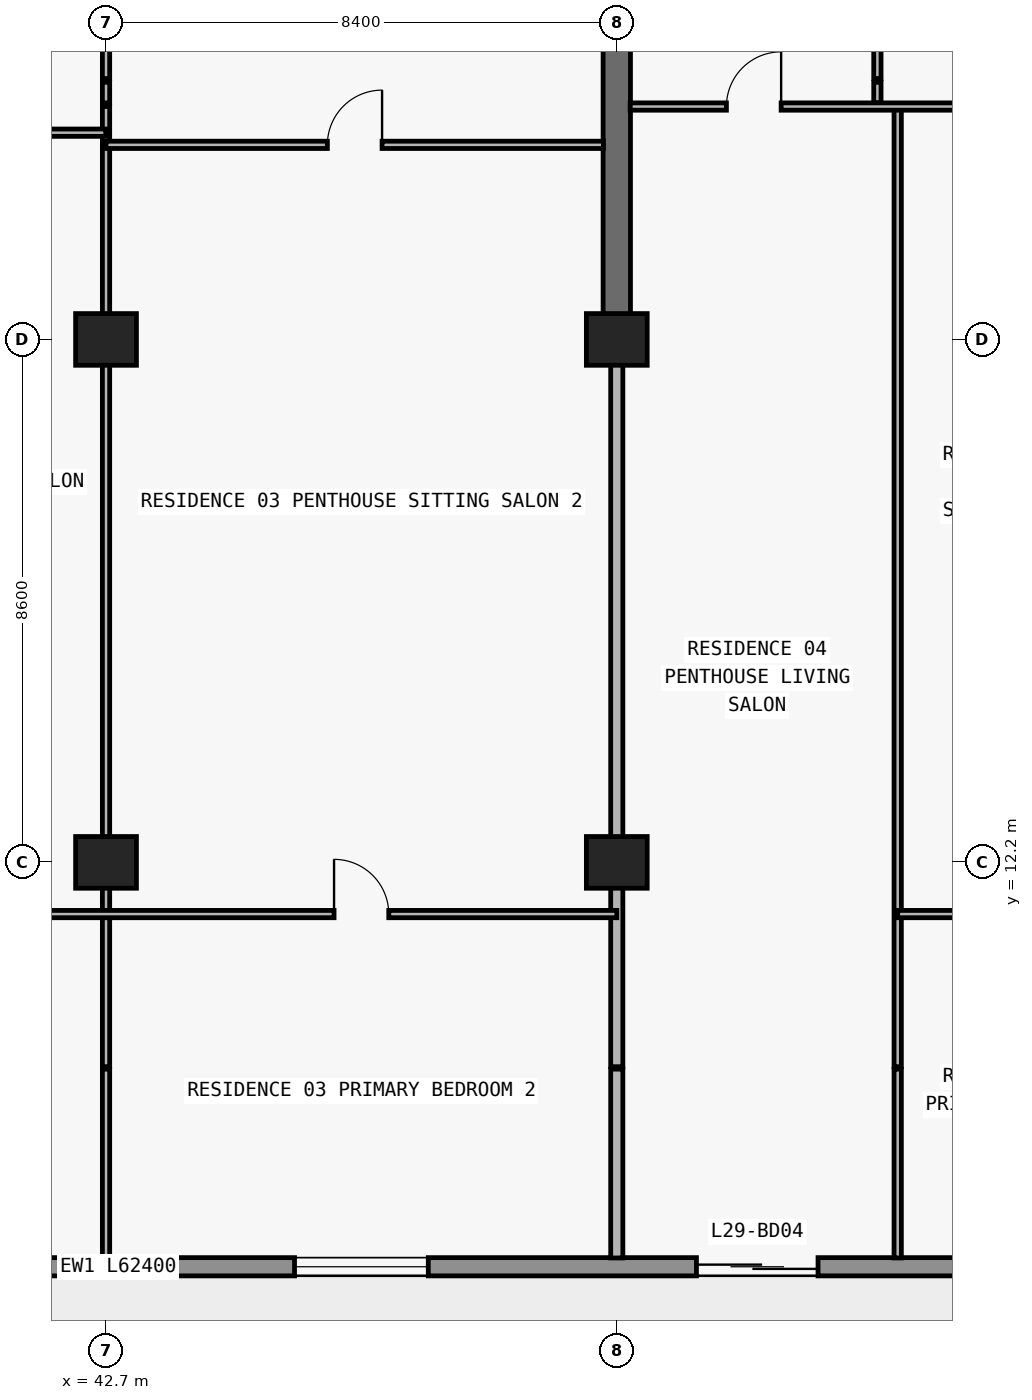
"""IFC4 building model, lengths in metres.
Left out: names, types, materials, properties, quantities, classifications, styles, units other than length and angle.
Written with IfcOpenShell. Run it as: python <this file> out.ifc"""

import sys

from ifc_helpers import new_model, si_unit, direction, frame, frame_2d, origin, origin_2d, place, context, subcontext, project, spatial, rectangle, extrude, element, fill, save


model = new_model("IFC4")
c1 = context("Model", 3, precision=1e-05, world=origin(), true_north=direction((0.0, 1.0)))
c2 = subcontext(c1, "Body", "Model", "MODEL_VIEW")
j1 = project(units=[si_unit("LENGTHUNIT", "METRE"), si_unit("PLANEANGLEUNIT", "RADIAN")], contexts=[c1])
p1 = place(None, origin())
s1 = spatial("IfcSite", under=j1, at=p1, CompositionType="ELEMENT")
p2 = place(p1, origin())
s2 = spatial("IfcBuilding", under=s1, at=p2, CompositionType="ELEMENT")
p3 = place(p2, frame((0.0, 0.0, 109.2)))
s3 = spatial("IfcBuildingStorey", under=s2, at=p3, CompositionType="ELEMENT", Elevation=109.2)
for number, where, z_axis, x_axis in (
    (1, (42.7, 12.2, 0.0), (0.0, 0.0, 1.0), (1.0, 0.0, 0.0)),
    (2, (51.1, 12.2, 0.0), (0.0, 0.0, 1.0), (1.0, 0.0, 0.0)),
    (3, (42.7, 20.8, 0.0), (0.0, 0.0, 1.0), (1.0, 0.0, 0.0)),
    (4, (51.1, 20.8, 0.0), (0.0, 0.0, 1.0), (1.0, 0.0, 0.0)),
):
    element("IfcColumn", number, at=place(p3, frame(where, z_axis=z_axis, x_axis=x_axis)), inside=s3, PredefinedType="COLUMN", context=c2, shape_type="SweptSolid", body=[
        extrude(rectangle(XDim=1.0, YDim=0.85, at=origin_2d()), origin(), (0.0, 0.0, 1.0), 3.05),
    ])
p4 = place(p3, frame((51.1, 20.8, 0.0), z_axis=(0.0, 0.0, 1.0), x_axis=(0.0, 1.0, 0.0)))
e5 = element("IfcWall", 5, at=p4, inside=s3, PredefinedType="SHEAR", context=c2, shape_type="SweptSolid", body=[
    extrude(rectangle(XDim=8.6, YDim=0.45, at=frame_2d((4.3, 0.0))), origin(), (0.0, 0.0, 1.0), 3.05),
])
p5 = place(p3, frame((70.1, 5.55, 0.0), z_axis=(0.0, 0.0, 1.0), x_axis=(-1.0, 0.0, 0.0)))
e6 = element("IfcWall", 6, at=p5, inside=s3, PredefinedType="STANDARD", context=c2, shape_type="SweptSolid", body=[
    extrude(rectangle(XDim=62.4, YDim=0.3, at=frame_2d((31.2, 0.0))), origin(), (0.0, 0.0, 1.0), 3.05),
])
p6 = place(p5, frame((57.226, 0.0, 0.0)))
e7 = element("IfcOpeningElement", 7, at=p6, cuts=e6, PredefinedType="OPENING", context=c2, shape_type="SweptSolid", body=[
    extrude(rectangle(XDim=2.0, YDim=2.3, at=frame_2d((1.0, 1.15))), frame((0.0, 0.16, 0.0), z_axis=(0.0, -1.0, 0.0), x_axis=(1.0, 0.0, 0.0)), (0.0, 0.0, 1.0), 0.32),
])
p7 = place(p5, frame((52.926, 0.0, 0.85)))
e8 = element("IfcOpeningElement", 8, at=p7, cuts=e6, PredefinedType="OPENING", context=c2, shape_type="SweptSolid", body=[
    extrude(rectangle(XDim=2.2, YDim=1.55, at=frame_2d((1.1, 0.775))), frame((0.0, 0.16, 0.0), z_axis=(0.0, -1.0, 0.0), x_axis=(1.0, 0.0, 0.0)), (0.0, 0.0, 1.0), 0.32),
])
p8 = place(p5, frame((48.49, 0.0, 0.0)))
e9 = element("IfcOpeningElement", 9, at=p8, cuts=e6, PredefinedType="OPENING", context=c2, shape_type="SweptSolid", body=[
    extrude(rectangle(XDim=2.0, YDim=2.3, at=frame_2d((1.0, 1.15))), frame((0.0, 0.16, 0.0), z_axis=(0.0, -1.0, 0.0), x_axis=(1.0, 0.0, 0.0)), (0.0, 0.0, 1.0), 0.32),
])
p9 = place(p5, frame((44.39, 0.0, 0.85)))
e10 = element("IfcOpeningElement", 10, at=p9, cuts=e6, PredefinedType="OPENING", context=c2, shape_type="SweptSolid", body=[
    extrude(rectangle(XDim=1.8, YDim=1.55, at=frame_2d((0.9, 0.775))), frame((0.0, 0.16, 0.0), z_axis=(0.0, -1.0, 0.0), x_axis=(1.0, 0.0, 0.0)), (0.0, 0.0, 1.0), 0.32),
])
p10 = place(p5, frame((40.49, 0.0, 0.0)))
e11 = element("IfcOpeningElement", 11, at=p10, cuts=e6, PredefinedType="OPENING", context=c2, shape_type="SweptSolid", body=[
    extrude(rectangle(XDim=2.0, YDim=2.3, at=frame_2d((1.0, 1.15))), frame((0.0, 0.16, 0.0), z_axis=(0.0, -1.0, 0.0), x_axis=(1.0, 0.0, 0.0)), (0.0, 0.0, 1.0), 0.32),
])
p11 = place(p5, frame((35.81, 0.0, 0.65)))
e12 = element("IfcOpeningElement", 12, at=p11, cuts=e6, PredefinedType="OPENING", context=c2, shape_type="SweptSolid", body=[
    extrude(rectangle(XDim=2.6, YDim=1.85, at=frame_2d((1.3, 0.925))), frame((0.0, 0.16, 0.0), z_axis=(0.0, -1.0, 0.0), x_axis=(1.0, 0.0, 0.0)), (0.0, 0.0, 1.0), 0.32),
])
p12 = place(p5, frame((30.1, 0.0, 0.85)))
e13 = element("IfcOpeningElement", 13, at=p12, cuts=e6, PredefinedType="OPENING", context=c2, shape_type="SweptSolid", body=[
    extrude(rectangle(XDim=2.2, YDim=1.55, at=frame_2d((1.1, 0.775))), frame((0.0, 0.16, 0.0), z_axis=(0.0, -1.0, 0.0), x_axis=(1.0, 0.0, 0.0)), (0.0, 0.0, 1.0), 0.32),
])
p13 = place(p5, frame((22.1, 0.0, 0.85)))
e14 = element("IfcOpeningElement", 14, at=p13, cuts=e6, PredefinedType="OPENING", context=c2, shape_type="SweptSolid", body=[
    extrude(rectangle(XDim=2.2, YDim=1.55, at=frame_2d((1.1, 0.775))), frame((0.0, 0.16, 0.0), z_axis=(0.0, -1.0, 0.0), x_axis=(1.0, 0.0, 0.0)), (0.0, 0.0, 1.0), 0.32),
])
p14 = place(p5, frame((15.69, 0.0, 0.0)))
e15 = element("IfcOpeningElement", 15, at=p14, cuts=e6, PredefinedType="OPENING", context=c2, shape_type="SweptSolid", body=[
    extrude(rectangle(XDim=2.0, YDim=2.3, at=frame_2d((1.0, 1.15))), frame((0.0, 0.16, 0.0), z_axis=(0.0, -1.0, 0.0), x_axis=(1.0, 0.0, 0.0)), (0.0, 0.0, 1.0), 0.32),
])
p15 = place(p5, frame((11.59, 0.0, 0.85)))
e16 = element("IfcOpeningElement", 16, at=p15, cuts=e6, PredefinedType="OPENING", context=c2, shape_type="SweptSolid", body=[
    extrude(rectangle(XDim=1.8, YDim=1.55, at=frame_2d((0.9, 0.775))), frame((0.0, 0.16, 0.0), z_axis=(0.0, -1.0, 0.0), x_axis=(1.0, 0.0, 0.0)), (0.0, 0.0, 1.0), 0.32),
])
p16 = place(p5, frame((7.626, 0.0, 0.0)))
e17 = element("IfcOpeningElement", 17, at=p16, cuts=e6, PredefinedType="OPENING", context=c2, shape_type="SweptSolid", body=[
    extrude(rectangle(XDim=2.0, YDim=2.3, at=frame_2d((1.0, 1.15))), frame((0.0, 0.16, 0.0), z_axis=(0.0, -1.0, 0.0), x_axis=(1.0, 0.0, 0.0)), (0.0, 0.0, 1.0), 0.32),
])
p17 = place(p5, frame((3.326, 0.0, 0.85)))
e18 = element("IfcOpeningElement", 18, at=p17, cuts=e6, PredefinedType="OPENING", context=c2, shape_type="SweptSolid", body=[
    extrude(rectangle(XDim=2.2, YDim=1.55, at=frame_2d((1.1, 0.775))), frame((0.0, 0.16, 0.0), z_axis=(0.0, -1.0, 0.0), x_axis=(1.0, 0.0, 0.0)), (0.0, 0.0, 1.0), 0.32),
])
p18 = place(p3, frame((42.7, 5.695, 0.0), z_axis=(0.0, 0.0, 1.0), x_axis=(0.0, 1.0, 0.0)))
e19 = element("IfcWall", 19, at=p18, inside=s3, PredefinedType="PARTITIONING", context=c2, shape_type="SweptSolid", body=[
    extrude(rectangle(XDim=3.105, YDim=0.12, at=frame_2d((1.552, 0.0))), origin(), (0.0, 0.0, 1.0), 3.05),
])
p19 = place(p3, frame((42.7, 8.84, 0.0), z_axis=(0.0, 0.0, 1.0), x_axis=(0.0, 1.0, 0.0)))
e20 = element("IfcWall", 20, at=p19, inside=s3, PredefinedType="PARTITIONING", context=c2, shape_type="SweptSolid", body=[
    extrude(rectangle(XDim=15.79, YDim=0.12, at=frame_2d((7.895, 0.0))), origin(), (0.0, 0.0, 1.0), 2.174),
])
p20 = place(p3, frame((42.7, 24.69, 0.0), z_axis=(0.0, 0.0, 1.0), x_axis=(0.0, 1.0, 0.0)))
e21 = element("IfcWall", 21, at=p20, inside=s3, PredefinedType="PARTITIONING", context=c2, shape_type="SweptSolid", body=[
    extrude(rectangle(XDim=0.34, YDim=0.12, at=frame_2d((0.17, 0.0))), origin(), (0.0, 0.0, 1.0), 2.174),
])
p21 = place(p3, frame((42.7, 25.09, 0.0), z_axis=(0.0, 0.0, 1.0), x_axis=(0.0, 1.0, 0.0)))
e22 = element("IfcWall", 22, at=p21, inside=s3, PredefinedType="PARTITIONING", context=c2, shape_type="SweptSolid", body=[
    extrude(rectangle(XDim=4.69, YDim=0.12, at=frame_2d((2.345, 0.0))), origin(), (0.0, 0.0, 1.0), 2.174),
])
p22 = place(p21, frame((1.305, 0.0, 0.0)))
e23 = element("IfcOpeningElement", 23, at=p22, cuts=e22, PredefinedType="OPENING", context=c2, shape_type="SweptSolid", body=[
    extrude(rectangle(XDim=0.9, YDim=2.124, at=frame_2d((0.45, 1.062))), frame((0.0, 0.07, 0.0), z_axis=(0.0, -1.0, 0.0), x_axis=(1.0, 0.0, 0.0)), (0.0, 0.0, 1.0), 0.14),
])
p23 = place(p3, frame((51.1, 5.695, 0.0), z_axis=(0.0, 0.0, 1.0), x_axis=(0.0, 1.0, 0.0)))
e24 = element("IfcWall", 24, at=p23, inside=s3, PredefinedType="PARTITIONING", context=c2, shape_type="SweptSolid", body=[
    extrude(rectangle(XDim=3.105, YDim=0.2, at=frame_2d((1.552, 0.0))), origin(), (0.0, 0.0, 1.0), 3.05),
])
p24 = place(p3, frame((51.1, 8.84, 0.0), z_axis=(0.0, 0.0, 1.0), x_axis=(0.0, 1.0, 0.0)))
e25 = element("IfcWall", 25, at=p24, inside=s3, PredefinedType="PARTITIONING", context=c2, shape_type="SweptSolid", body=[
    extrude(rectangle(XDim=11.955, YDim=0.2, at=frame_2d((5.978, 0.0))), origin(), (0.0, 0.0, 1.0), 2.174),
])
p25 = place(p3, frame((55.386, 24.69, 0.0), z_axis=(0.0, 0.0, 1.0), x_axis=(0.0, 1.0, 0.0)))
e26 = element("IfcWall", 26, at=p25, inside=s3, PredefinedType="PARTITIONING", context=c2, shape_type="SweptSolid", body=[
    extrude(rectangle(XDim=0.34, YDim=0.12, at=frame_2d((0.17, 0.0))), origin(), (0.0, 0.0, 1.0), 2.486),
])
p26 = place(p3, frame((55.386, 25.09, 0.0), z_axis=(0.0, 0.0, 1.0), x_axis=(0.0, 1.0, 0.0)))
e27 = element("IfcWall", 27, at=p26, inside=s3, PredefinedType="PARTITIONING", context=c2, shape_type="SweptSolid", body=[
    extrude(rectangle(XDim=4.69, YDim=0.12, at=frame_2d((2.345, 0.0))), origin(), (0.0, 0.0, 1.0), 2.486),
])
p27 = place(p26, frame((1.895, 0.0, 0.0)))
e28 = element("IfcOpeningElement", 28, at=p27, cuts=e27, PredefinedType="OPENING", context=c2, shape_type="SweptSolid", body=[
    extrude(rectangle(XDim=0.9, YDim=2.15, at=frame_2d((0.45, 1.075))), frame((0.0, 0.07, 0.0), z_axis=(0.0, -1.0, 0.0), x_axis=(1.0, 0.0, 0.0)), (0.0, 0.0, 1.0), 0.14),
])
p28 = place(p3, frame((55.72, 5.695, 0.0), z_axis=(0.0, 0.0, 1.0), x_axis=(0.0, 1.0, 0.0)))
e29 = element("IfcWall", 29, at=p28, inside=s3, PredefinedType="PARTITIONING", context=c2, shape_type="SweptSolid", body=[
    extrude(rectangle(XDim=3.105, YDim=0.12, at=frame_2d((1.552, 0.0))), origin(), (0.0, 0.0, 1.0), 3.05),
])
p29 = place(p3, frame((55.72, 8.84, 0.0), z_axis=(0.0, 0.0, 1.0), x_axis=(0.0, 1.0, 0.0)))
e30 = element("IfcWall", 30, at=p29, inside=s3, PredefinedType="PARTITIONING", context=c2, shape_type="SweptSolid", body=[
    extrude(rectangle(XDim=15.79, YDim=0.12, at=frame_2d((7.895, 0.0))), origin(), (0.0, 0.0, 1.0), 3.05),
])
p30 = place(p3, frame((35.1, 11.35, 0.0), z_axis=(0.0, 0.0, 1.0), x_axis=(1.0, 0.0, 0.0)))
e31 = element("IfcWall", 31, at=p30, inside=s3, PredefinedType="PARTITIONING", context=c2, shape_type="SweptSolid", body=[
    extrude(rectangle(XDim=16.0, YDim=0.12, at=frame_2d((8.0, 0.0))), origin(), (0.0, 0.0, 1.0), 3.05),
])
p31 = place(p30, frame((3.35, 0.0, 0.0)))
e32 = element("IfcOpeningElement", 32, at=p31, cuts=e31, PredefinedType="OPENING", context=c2, shape_type="SweptSolid", body=[
    extrude(rectangle(XDim=0.9, YDim=2.15, at=frame_2d((0.45, 1.075))), frame((0.0, 0.07, 0.0), z_axis=(0.0, -1.0, 0.0), x_axis=(1.0, 0.0, 0.0)), (0.0, 0.0, 1.0), 0.14),
])
p32 = place(p30, frame((11.35, 0.0, 0.0)))
e33 = element("IfcOpeningElement", 33, at=p32, cuts=e31, PredefinedType="OPENING", context=c2, shape_type="SweptSolid", body=[
    extrude(rectangle(XDim=0.9, YDim=2.15, at=frame_2d((0.45, 1.075))), frame((0.0, 0.07, 0.0), z_axis=(0.0, -1.0, 0.0), x_axis=(1.0, 0.0, 0.0)), (0.0, 0.0, 1.0), 0.14),
])
p33 = place(p3, frame((55.72, 11.35, 0.0), z_axis=(0.0, 0.0, 1.0), x_axis=(1.0, 0.0, 0.0)))
e34 = element("IfcWall", 34, at=p33, inside=s3, PredefinedType="PARTITIONING", context=c2, shape_type="SweptSolid", body=[
    extrude(rectangle(XDim=3.78, YDim=0.12, at=frame_2d((1.89, 0.0))), origin(), (0.0, 0.0, 1.0), 3.05),
])
p34 = place(p33, frame((1.44, 0.0, 0.0)))
e35 = element("IfcOpeningElement", 35, at=p34, cuts=e34, PredefinedType="OPENING", context=c2, shape_type="SweptSolid", body=[
    extrude(rectangle(XDim=0.9, YDim=2.15, at=frame_2d((0.45, 1.075))), frame((0.0, 0.07, 0.0), z_axis=(0.0, -1.0, 0.0), x_axis=(1.0, 0.0, 0.0)), (0.0, 0.0, 1.0), 0.14),
])
p35 = place(p3, frame((42.7, 24.0, 0.0), z_axis=(0.0, 0.0, 1.0), x_axis=(1.0, 0.0, 0.0)))
e36 = element("IfcWall", 36, at=p35, inside=s3, PredefinedType="PARTITIONING", context=c2, shape_type="SweptSolid", body=[
    extrude(rectangle(XDim=8.18, YDim=0.12, at=frame_2d((4.09, 0.0))), origin(), (0.0, 0.0, 1.0), 3.05),
])
p36 = place(p35, frame((3.64, 0.0, 0.0)))
e37 = element("IfcOpeningElement", 37, at=p36, cuts=e36, PredefinedType="OPENING", context=c2, shape_type="SweptSolid", body=[
    extrude(rectangle(XDim=0.9, YDim=2.15, at=frame_2d((0.45, 1.075))), frame((0.0, 0.07, 0.0), z_axis=(0.0, -1.0, 0.0), x_axis=(1.0, 0.0, 0.0)), (0.0, 0.0, 1.0), 0.14),
])
p37 = place(p3, frame((35.105, 24.2, 0.0), z_axis=(0.0, 0.0, 1.0), x_axis=(1.0, 0.0, 0.0)))
e38 = element("IfcWall", 38, at=p37, inside=s3, PredefinedType="PARTITIONING", context=c2, shape_type="SweptSolid", body=[
    extrude(rectangle(XDim=7.59, YDim=0.12, at=frame_2d((3.795, 0.0))), origin(), (0.0, 0.0, 1.0), 3.05),
])
p38 = place(p37, frame((3.345, 0.0, 0.0)))
e39 = element("IfcOpeningElement", 39, at=p38, cuts=e38, PredefinedType="OPENING", context=c2, shape_type="SweptSolid", body=[
    extrude(rectangle(XDim=0.9, YDim=2.15, at=frame_2d((0.45, 1.075))), frame((0.0, 0.07, 0.0), z_axis=(0.0, -1.0, 0.0), x_axis=(1.0, 0.0, 0.0)), (0.0, 0.0, 1.0), 0.14),
])
p39 = place(p3, frame((51.32, 24.63, 0.0), z_axis=(0.0, 0.0, 1.0), x_axis=(1.0, 0.0, 0.0)))
e40 = element("IfcWall", 40, at=p39, inside=s3, PredefinedType="PARTITIONING", context=c2, shape_type="SweptSolid", body=[
    extrude(rectangle(XDim=8.18, YDim=0.12, at=frame_2d((4.09, 0.0))), origin(), (0.0, 0.0, 1.0), 3.05),
])
p40 = place(p39, frame((1.583, 0.0, 0.0)))
e41 = element("IfcOpeningElement", 41, at=p40, cuts=e40, PredefinedType="OPENING", context=c2, shape_type="SweptSolid", body=[
    extrude(rectangle(XDim=0.9, YDim=2.15, at=frame_2d((0.45, 1.075))), frame((0.0, 0.07, 0.0), z_axis=(0.0, -1.0, 0.0), x_axis=(1.0, 0.0, 0.0)), (0.0, 0.0, 1.0), 0.14),
])
p41 = place(p39, frame((5.84, 0.0, 0.0)))
e42 = element("IfcOpeningElement", 42, at=p41, cuts=e40, PredefinedType="OPENING", context=c2, shape_type="SweptSolid", body=[
    extrude(rectangle(XDim=0.9, YDim=2.15, at=frame_2d((0.45, 1.075))), frame((0.0, 0.07, 0.0), z_axis=(0.0, -1.0, 0.0), x_axis=(1.0, 0.0, 0.0)), (0.0, 0.0, 1.0), 0.14),
])
p42 = place(p13, origin())
e43 = element("IfcWindow", 43, at=p42, inside=s3, PartitioningType="SINGLE_PANEL", PredefinedType="WINDOW", context=c2, shape_type="SweptSolid", body=[
    extrude(rectangle(XDim=2.2, YDim=1.55, at=frame_2d((1.1, 0.775))), frame((0.0, 0.03, 0.0), z_axis=(0.0, -1.0, 0.0), x_axis=(1.0, 0.0, 0.0)), (0.0, 0.0, 1.0), 0.06),
])
fill(e14, e43)
p43 = place(p14, origin())
e44 = element("IfcDoor", 44, at=p43, inside=s3, OperationType="DOUBLE_DOOR_SLIDING", PredefinedType="DOOR", context=c2, shape_type="SweptSolid", body=[
    extrude(rectangle(XDim=2.0, YDim=2.3, at=frame_2d((1.0, 1.15))), frame((0.0, 0.025, 0.0), z_axis=(0.0, -1.0, 0.0), x_axis=(1.0, 0.0, 0.0)), (0.0, 0.0, 1.0), 0.05),
])
fill(e15, e44)
p44 = place(p36, origin())
e45 = element("IfcDoor", 45, at=p44, inside=s3, OperationType="SINGLE_SWING_RIGHT", PredefinedType="DOOR", context=c2, shape_type="SweptSolid", body=[
    extrude(rectangle(XDim=0.9, YDim=2.15, at=frame_2d((0.45, 1.075))), frame((0.0, 0.025, 0.0), z_axis=(0.0, -1.0, 0.0), x_axis=(1.0, 0.0, 0.0)), (0.0, 0.0, 1.0), 0.05),
])
fill(e37, e45)
p45 = place(p32, origin())
e46 = element("IfcDoor", 46, at=p45, inside=s3, OperationType="SINGLE_SWING_LEFT", PredefinedType="DOOR", context=c2, shape_type="SweptSolid", body=[
    extrude(rectangle(XDim=0.9, YDim=2.15, at=frame_2d((0.45, 1.075))), frame((0.0, 0.025, 0.0), z_axis=(0.0, -1.0, 0.0), x_axis=(1.0, 0.0, 0.0)), (0.0, 0.0, 1.0), 0.05),
])
fill(e33, e46)
p46 = place(p40, origin())
e47 = element("IfcDoor", 47, at=p46, inside=s3, OperationType="SINGLE_SWING_RIGHT", PredefinedType="DOOR", context=c2, shape_type="SweptSolid", body=[
    extrude(rectangle(XDim=0.9, YDim=2.15, at=frame_2d((0.45, 1.075))), frame((0.0, 0.025, 0.0), z_axis=(0.0, -1.0, 0.0), x_axis=(1.0, 0.0, 0.0)), (0.0, 0.0, 1.0), 0.05),
])
fill(e41, e47)
save(model, sys.argv[1])
